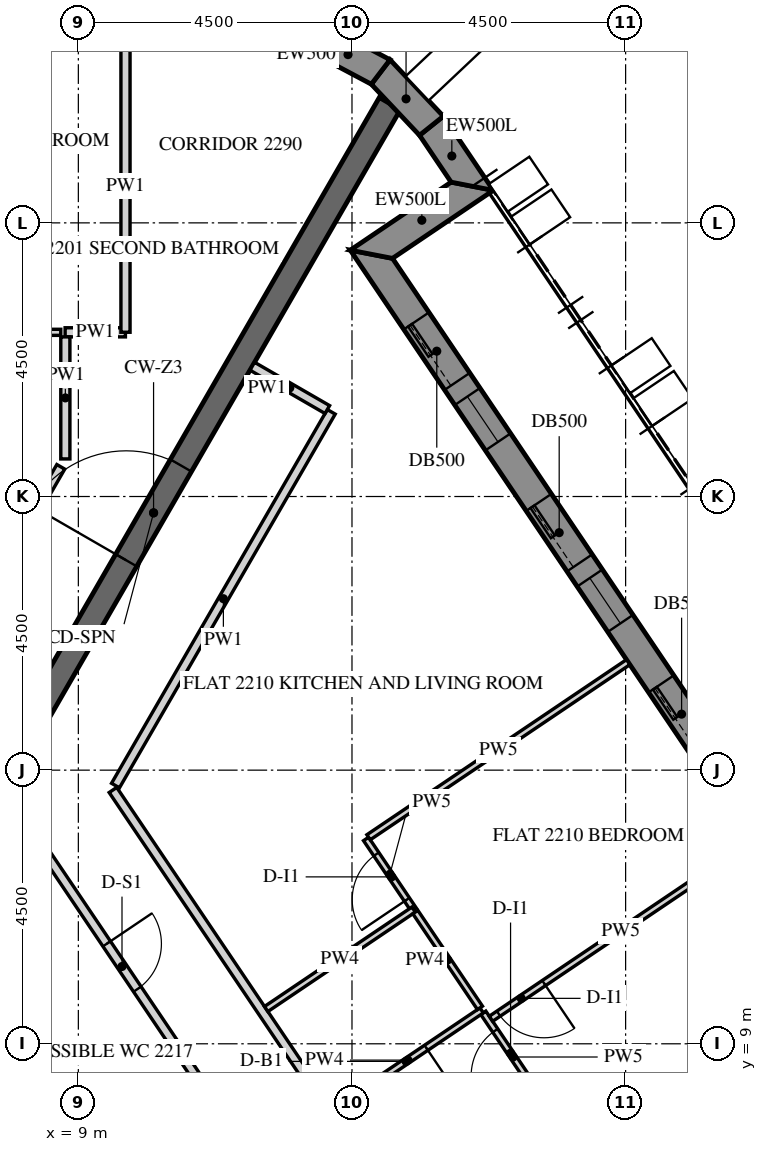
"""IFC4 building model, lengths in metres.
Left out: names, types, materials, properties, quantities, classifications, styles, units other than length and angle.
Written with IfcOpenShell. Run it as: python <this file> out.ifc"""

import sys

from ifc_helpers import new_model, si_unit, direction, frame, frame_2d, origin, place, context, subcontext, project, spatial, polyline, rectangle, outline, extrude, element, fill, save


model = new_model("IFC4")
c1 = context("Model", 3, precision=1e-05, world=origin(), true_north=direction((0.0, 1.0)))
c2 = subcontext(c1, "Body", "Model", "MODEL_VIEW")
j1 = project(units=[si_unit("LENGTHUNIT", "METRE"), si_unit("PLANEANGLEUNIT", "RADIAN")], contexts=[c1])
p1 = place(None, origin())
s1 = spatial("IfcSite", under=j1, at=p1, CompositionType="ELEMENT")
p2 = place(p1, origin())
s2 = spatial("IfcBuilding", under=s1, at=p2, CompositionType="ELEMENT")
p3 = place(p2, frame((0.0, 0.0, 279.6)))
s3 = spatial("IfcBuildingStorey", under=s2, at=p3, CompositionType="ELEMENT", Elevation=279.6)
p4 = place(p3, frame((26.706, 2.879, -0.15), z_axis=(0.0, 0.0, 1.0), x_axis=(-0.559197891507, 0.829034208061, 0.0)))
e1 = element("IfcWall", 1, at=p4, inside=s3, PredefinedType="SOLIDWALL", context=c2, shape_type="SweptSolid", body=[
    extrude(outline(polyline([(0.25, -0.25), (22.795, -0.25), (23.295, 0.25), (-0.25, 0.25), (0.25, -0.25)])), origin(), (0.0, 0.0, 1.0), 3.9),
])
p5 = place(p4, frame((1.323, 0.0, 1.05)))
e2 = element("IfcOpeningElement", 2, at=p5, cuts=e1, PredefinedType="OPENING", context=c2, shape_type="SweptSolid", body=[
    extrude(rectangle(XDim=0.9, YDim=1.5, at=frame_2d((0.45, 0.75))), frame((0.0, 0.26, 0.0), z_axis=(0.0, -1.0, 0.0), x_axis=(1.0, 0.0, 0.0)), (0.0, 0.0, 1.0), 0.52),
])
p6 = place(p4, frame((2.522, 0.0, 0.15)))
e3 = element("IfcOpeningElement", 3, at=p6, cuts=e1, PredefinedType="OPENING", context=c2, shape_type="SweptSolid", body=[
    extrude(rectangle(XDim=1.2, YDim=2.4, at=frame_2d((0.6, 1.2))), frame((0.0, 0.26, 0.0), z_axis=(0.0, -1.0, 0.0), x_axis=(1.0, 0.0, 0.0)), (0.0, 0.0, 1.0), 0.52),
])
p7 = place(p4, frame((4.922, 0.0, 1.05)))
e4 = element("IfcOpeningElement", 4, at=p7, cuts=e1, PredefinedType="OPENING", context=c2, shape_type="SweptSolid", body=[
    extrude(rectangle(XDim=0.9, YDim=1.5, at=frame_2d((0.45, 0.75))), frame((0.0, 0.26, 0.0), z_axis=(0.0, -1.0, 0.0), x_axis=(1.0, 0.0, 0.0)), (0.0, 0.0, 1.0), 0.52),
])
p8 = place(p4, frame((6.122, 0.0, 0.15)))
e5 = element("IfcOpeningElement", 5, at=p8, cuts=e1, PredefinedType="OPENING", context=c2, shape_type="SweptSolid", body=[
    extrude(rectangle(XDim=1.2, YDim=2.4, at=frame_2d((0.6, 1.2))), frame((0.0, 0.26, 0.0), z_axis=(0.0, -1.0, 0.0), x_axis=(1.0, 0.0, 0.0)), (0.0, 0.0, 1.0), 0.52),
])
p9 = place(p4, frame((8.522, 0.0, 1.05)))
e6 = element("IfcOpeningElement", 6, at=p9, cuts=e1, PredefinedType="OPENING", context=c2, shape_type="SweptSolid", body=[
    extrude(rectangle(XDim=0.9, YDim=1.5, at=frame_2d((0.45, 0.75))), frame((0.0, 0.26, 0.0), z_axis=(0.0, -1.0, 0.0), x_axis=(1.0, 0.0, 0.0)), (0.0, 0.0, 1.0), 0.52),
])
p10 = place(p4, frame((9.722, 0.0, 0.15)))
e7 = element("IfcOpeningElement", 7, at=p10, cuts=e1, PredefinedType="OPENING", context=c2, shape_type="SweptSolid", body=[
    extrude(rectangle(XDim=1.2, YDim=2.4, at=frame_2d((0.6, 1.2))), frame((0.0, 0.26, 0.0), z_axis=(0.0, -1.0, 0.0), x_axis=(1.0, 0.0, 0.0)), (0.0, 0.0, 1.0), 0.52),
])
p11 = place(p4, frame((12.122, 0.0, 1.05)))
e8 = element("IfcOpeningElement", 8, at=p11, cuts=e1, PredefinedType="OPENING", context=c2, shape_type="SweptSolid", body=[
    extrude(rectangle(XDim=0.9, YDim=1.5, at=frame_2d((0.45, 0.75))), frame((0.0, 0.26, 0.0), z_axis=(0.0, -1.0, 0.0), x_axis=(1.0, 0.0, 0.0)), (0.0, 0.0, 1.0), 0.52),
])
p12 = place(p4, frame((13.323, 0.0, 0.15)))
e9 = element("IfcOpeningElement", 9, at=p12, cuts=e1, PredefinedType="OPENING", context=c2, shape_type="SweptSolid", body=[
    extrude(rectangle(XDim=1.2, YDim=2.4, at=frame_2d((0.6, 1.2))), frame((0.0, 0.26, 0.0), z_axis=(0.0, -1.0, 0.0), x_axis=(1.0, 0.0, 0.0)), (0.0, 0.0, 1.0), 0.52),
])
p13 = place(p4, frame((15.722, 0.0, 1.05)))
e10 = element("IfcOpeningElement", 10, at=p13, cuts=e1, PredefinedType="OPENING", context=c2, shape_type="SweptSolid", body=[
    extrude(rectangle(XDim=0.9, YDim=1.5, at=frame_2d((0.45, 0.75))), frame((0.0, 0.26, 0.0), z_axis=(0.0, -1.0, 0.0), x_axis=(1.0, 0.0, 0.0)), (0.0, 0.0, 1.0), 0.52),
])
p14 = place(p4, frame((16.922, 0.0, 0.15)))
e11 = element("IfcOpeningElement", 11, at=p14, cuts=e1, PredefinedType="OPENING", context=c2, shape_type="SweptSolid", body=[
    extrude(rectangle(XDim=1.2, YDim=2.4, at=frame_2d((0.6, 1.2))), frame((0.0, 0.26, 0.0), z_axis=(0.0, -1.0, 0.0), x_axis=(1.0, 0.0, 0.0)), (0.0, 0.0, 1.0), 0.52),
])
p15 = place(p4, frame((19.323, 0.0, 1.05)))
e12 = element("IfcOpeningElement", 12, at=p15, cuts=e1, PredefinedType="OPENING", context=c2, shape_type="SweptSolid", body=[
    extrude(rectangle(XDim=0.9, YDim=1.5, at=frame_2d((0.45, 0.75))), frame((0.0, 0.26, 0.0), z_axis=(0.0, -1.0, 0.0), x_axis=(1.0, 0.0, 0.0)), (0.0, 0.0, 1.0), 0.52),
])
p16 = place(p4, frame((20.522, 0.0, 0.15)))
e13 = element("IfcOpeningElement", 13, at=p16, cuts=e1, PredefinedType="OPENING", context=c2, shape_type="SweptSolid", body=[
    extrude(rectangle(XDim=1.2, YDim=2.4, at=frame_2d((0.6, 1.2))), frame((0.0, 0.26, 0.0), z_axis=(0.0, -1.0, 0.0), x_axis=(1.0, 0.0, 0.0)), (0.0, 0.0, 1.0), 0.52),
])
p17 = place(p3, frame((13.819, 21.984, -0.15), z_axis=(0.0, 0.0, 1.0), x_axis=(0.829052389485, 0.559170935841, 0.0)))
e14 = element("IfcWall", 14, at=p17, inside=s3, PredefinedType="SOLIDWALL", context=c2, shape_type="SweptSolid", body=[
    extrude(outline(polyline([(0.25, -0.25), (2.25, -0.25), (1.75, 0.25), (-0.25, 0.25), (0.25, -0.25)])), origin(), (0.0, 0.0, 1.0), 3.9),
])
p18 = place(p3, frame((15.478, 23.102, -0.15), z_axis=(0.0, 0.0, 1.0), x_axis=(-0.559245726333, 0.829001940636, 0.0)))
e15 = element("IfcWall", 15, at=p18, inside=s3, PredefinedType="SOLIDWALL", context=c2, shape_type="SweptSolid", body=[
    extrude(outline(polyline([(-0.25, -0.25), (1.221, -0.25), (1.18, 0.25), (0.25, 0.25), (-0.25, -0.25)])), origin(), (0.0, 0.0, 1.0), 3.9),
])
p19 = place(p3, frame((14.806, 24.097, -0.15), z_axis=(0.0, 0.0, 1.0), x_axis=(-0.686234452793, 0.727380420275, 0.0)))
e16 = element("IfcWall", 16, at=p19, inside=s3, PredefinedType="SOLIDWALL", context=c2, shape_type="SweptSolid", body=[
    extrude(outline(polyline([(-0.021, -0.25), (1.257, -0.25), (1.175, 0.25), (0.021, 0.25), (-0.021, -0.25)])), origin(), (0.0, 0.0, 1.0), 3.9),
])
p20 = place(p3, frame((13.972, 24.982, -0.15), z_axis=(0.0, 0.0, 1.0), x_axis=(-0.882902492938, 0.469556373575, 0.0)))
e17 = element("IfcWall", 17, at=p20, inside=s3, PredefinedType="SOLIDWALL", context=c2, shape_type="SweptSolid", body=[
    extrude(outline(polyline([(-0.041, -0.25), (1.257, -0.25), (1.175, 0.25), (0.041, 0.25), (-0.041, -0.25)])), origin(), (0.0, 0.0, 1.0), 3.9),
])
p21 = place(p3, frame((12.471, 0.0, -0.15), z_axis=(0.0, 0.0, 1.0), x_axis=(-0.499996419489, 0.866027470984, 0.0)))
e18 = element("IfcWall", 18, at=p21, inside=s3, PredefinedType="SHEAR", context=c2, shape_type="SweptSolid", body=[
    extrude(outline(polyline([(-0.115, -0.2), (12.586, -0.2), (12.355, 0.2), (0.115, 0.2), (-0.115, -0.2)])), origin(), (0.0, 0.0, 1.0), 3.9),
])
p22 = place(p21, frame((5.306, 0.0, 0.15)))
e19 = element("IfcOpeningElement", 19, at=p22, cuts=e18, PredefinedType="OPENING", context=c2, shape_type="SweptSolid", body=[
    extrude(rectangle(XDim=1.8, YDim=2.4, at=frame_2d((0.9, 1.2))), frame((0.0, 0.21, 0.0), z_axis=(0.0, -1.0, 0.0), x_axis=(1.0, 0.0, 0.0)), (0.0, 0.0, 1.0), 0.42),
])
p23 = place(p3, frame((6.351, 11.0, -0.15), z_axis=(0.0, 0.0, 1.0), x_axis=(0.499998894578, 0.866026041999, 0.0)))
e20 = element("IfcWall", 20, at=p23, inside=s3, PredefinedType="SHEAR", context=c2, shape_type="SweptSolid", body=[
    extrude(rectangle(XDim=15.544, YDim=0.4, at=frame_2d((7.772, 0.0))), origin(), (0.0, 0.0, 1.0), 3.9),
])
p24 = place(p23, frame((6.872, 0.0, 0.15)))
e21 = element("IfcOpeningElement", 21, at=p24, cuts=e20, PredefinedType="OPENING", context=c2, shape_type="SweptSolid", body=[
    extrude(rectangle(XDim=1.8, YDim=2.4, at=frame_2d((0.9, 1.2))), frame((0.0, 0.21, 0.0), z_axis=(0.0, -1.0, 0.0), x_axis=(1.0, 0.0, 0.0)), (0.0, 0.0, 1.0), 0.42),
])
p25 = place(p3, frame((9.774, 20.7, 0.0), z_axis=(0.0, 0.0, 1.0), x_axis=(-1.0, 0.0, 0.0)))
e22 = element("IfcWall", 22, at=p25, inside=s3, PredefinedType="PARTITIONING", context=c2, shape_type="SweptSolid", body=[
    extrude(rectangle(XDim=0.991, YDim=0.15, at=frame_2d((0.496, 0.0))), origin(), (0.0, 0.0, 1.0), 2.988),
])
p26 = place(p3, frame((9.775, 25.5, 0.0), z_axis=(0.0, 0.0, 1.0), x_axis=(0.0, -1.0, 0.0)))
e23 = element("IfcWall", 23, at=p26, inside=s3, PredefinedType="PARTITIONING", context=c2, shape_type="SweptSolid", body=[
    extrude(rectangle(XDim=4.799, YDim=0.15, at=frame_2d((2.399, 0.0))), origin(), (0.0, 0.0, 1.0), 2.988),
])
p27 = place(p3, frame((8.786, 20.625, 0.0), z_axis=(0.0, 0.0, 1.0), x_axis=(0.0, -1.0, 0.0)))
e24 = element("IfcWall", 24, at=p27, inside=s3, PredefinedType="PARTITIONING", context=c2, shape_type="SweptSolid", body=[
    extrude(rectangle(XDim=2.007, YDim=0.15, at=frame_2d((1.003, 0.0))), origin(), (0.0, 0.0, 1.0), 2.988),
])
p28 = place(p3, frame((8.711, 18.488, 0.0), z_axis=(0.0, 0.0, 1.0), x_axis=(-0.500075402517, -0.865981865744, 0.0)))
e25 = element("IfcWall", 25, at=p28, inside=s3, PredefinedType="PARTITIONING", context=c2, shape_type="SweptSolid", body=[
    extrude(rectangle(XDim=2.515, YDim=0.15, at=frame_2d((1.257, 0.0))), origin(), (0.0, 0.0, 1.0), 2.988),
])
p29 = place(p3, frame((19.228, -1.146, 0.0), z_axis=(0.0, 0.0, 1.0), x_axis=(-0.559173750718, 0.829050490928, 0.0)))
e26 = element("IfcWall", 26, at=p29, inside=s3, PredefinedType="PARTITIONING", context=c2, shape_type="SweptSolid", body=[
    extrude(rectangle(XDim=17.273, YDim=0.15, at=frame_2d((8.637, 0.0))), origin(), (0.0, 0.0, 1.0), 2.988),
])
p30 = place(p29, frame((9.478, 0.0, 0.0)))
e27 = element("IfcOpeningElement", 27, at=p30, cuts=e26, PredefinedType="OPENING", context=c2, shape_type="SweptSolid", body=[
    extrude(rectangle(XDim=1.0, YDim=2.1, at=frame_2d((0.5, 1.05))), frame((0.0, 0.085, 0.0), z_axis=(0.0, -1.0, 0.0), x_axis=(1.0, 0.0, 0.0)), (0.0, 0.0, 1.0), 0.17),
])
p31 = place(p3, frame((9.611, 13.246, 0.0), z_axis=(0.0, 0.0, 1.0), x_axis=(0.499994435258, 0.866028616566, 0.0)))
e28 = element("IfcWall", 28, at=p31, inside=s3, PredefinedType="PARTITIONING", context=c2, shape_type="SweptSolid", body=[
    extrude(rectangle(XDim=7.097, YDim=0.15, at=frame_2d((3.548, 0.0))), origin(), (0.0, 0.0, 1.0), 2.988),
])
p32 = place(p3, frame((13.094, 19.43, 0.0), z_axis=(0.0, 0.0, 1.0), x_axis=(-0.866062911188, 0.499935029643, 0.0)))
e29 = element("IfcWall", 29, at=p32, inside=s3, PredefinedType="PARTITIONING", context=c2, shape_type="SweptSolid", body=[
    extrude(rectangle(XDim=1.425, YDim=0.15, at=frame_2d((0.712, 0.0))), origin(), (0.0, 0.0, 1.0), 2.988),
])
p33 = place(p3, frame((8.028, 12.777, 0.0), z_axis=(0.0, 0.0, 1.0), x_axis=(0.559175239609, -0.829049486707, 0.0)))
e30 = element("IfcWall", 30, at=p33, inside=s3, PredefinedType="PARTITIONING", context=c2, shape_type="SweptSolid", body=[
    extrude(rectangle(XDim=6.045, YDim=0.15, at=frame_2d((3.022, 0.0))), origin(), (0.0, 0.0, 1.0), 2.988),
])
p34 = place(p33, frame((2.572, 0.0, 0.0)))
e31 = element("IfcOpeningElement", 31, at=p34, cuts=e30, PredefinedType="OPENING", context=c2, shape_type="SweptSolid", body=[
    extrude(rectangle(XDim=0.9, YDim=2.1, at=frame_2d((0.45, 1.05))), frame((0.0, 0.085, 0.0), z_axis=(0.0, -1.0, 0.0), x_axis=(1.0, 0.0, 0.0)), (0.0, 0.0, 1.0), 0.17),
])
p35 = place(p3, frame((6.836, 20.7, 0.0), z_axis=(0.0, 0.0, 1.0), x_axis=(1.0, 0.0, 0.0)))
e32 = element("IfcWall", 32, at=p35, inside=s3, PredefinedType="PARTITIONING", context=c2, shape_type="SweptSolid", body=[
    extrude(rectangle(XDim=1.875, YDim=0.1, at=frame_2d((0.938, 0.0))), origin(), (0.0, 0.0, 1.0), 2.988),
])
p36 = place(p3, frame((22.069, 9.307, 0.0), z_axis=(0.0, 0.0, 1.0), x_axis=(-0.829042649773, -0.559185376111, 0.0)))
e33 = element("IfcWall", 33, at=p36, inside=s3, PredefinedType="PARTITIONING", context=c2, shape_type="SweptSolid", body=[
    extrude(rectangle(XDim=8.125, YDim=0.18, at=frame_2d((4.062, 0.0))), origin(), (0.0, 0.0, 1.0), 2.988),
])
p37 = place(p3, frame((14.515, 11.206, 0.0), z_axis=(0.0, 0.0, 1.0), x_axis=(-0.559272477643, 0.828983893542, 0.0)))
e34 = element("IfcWall", 34, at=p37, inside=s3, PredefinedType="PARTITIONING", context=c2, shape_type="SweptSolid", body=[
    extrude(rectangle(XDim=1.402, YDim=0.1, at=frame_2d((0.701, 0.0))), origin(), (0.0, 0.0, 1.0), 2.988),
])
p38 = place(p37, frame((0.2, 0.0, 0.0)))
e35 = element("IfcOpeningElement", 35, at=p38, cuts=e34, PredefinedType="OPENING", context=c2, shape_type="SweptSolid", body=[
    extrude(rectangle(XDim=0.9, YDim=2.1, at=frame_2d((0.45, 1.05))), frame((0.0, 0.06, 0.0), z_axis=(0.0, -1.0, 0.0), x_axis=(1.0, 0.0, 0.0)), (0.0, 0.0, 1.0), 0.12),
])
p39 = place(p3, frame((13.773, 12.396, 0.0), z_axis=(0.0, 0.0, 1.0), x_axis=(0.82903328576, 0.559199258853, 0.0)))
e36 = element("IfcWall", 36, at=p39, inside=s3, PredefinedType="PARTITIONING", context=c2, shape_type="SweptSolid", body=[
    extrude(rectangle(XDim=5.15, YDim=0.1, at=frame_2d((2.575, 0.0))), origin(), (0.0, 0.0, 1.0), 2.988),
])
p40 = place(p3, frame((12.089, 9.572, 0.0), z_axis=(0.0, 0.0, 1.0), x_axis=(0.829046031219, 0.559180362781, 0.0)))
e37 = element("IfcWall", 37, at=p40, inside=s3, PredefinedType="PARTITIONING", context=c2, shape_type="SweptSolid", body=[
    extrude(rectangle(XDim=2.925, YDim=0.1, at=frame_2d((1.462, 0.0))), origin(), (0.0, 0.0, 1.0), 2.988),
])
p41 = place(p3, frame((16.64, 8.056, 0.0), z_axis=(0.0, 0.0, 1.0), x_axis=(-0.559157243835, 0.829061624167, 0.0)))
e38 = element("IfcWall", 38, at=p41, inside=s3, PredefinedType="PARTITIONING", context=c2, shape_type="SweptSolid", body=[
    extrude(rectangle(XDim=1.754, YDim=0.1, at=frame_2d((0.877, 0.0))), origin(), (0.0, 0.0, 1.0), 2.988),
])
p42 = place(p41, frame((0.502, 0.0, 0.0)))
e39 = element("IfcOpeningElement", 39, at=p42, cuts=e38, PredefinedType="OPENING", context=c2, shape_type="SweptSolid", body=[
    extrude(rectangle(XDim=0.9, YDim=2.1, at=frame_2d((0.45, 1.05))), frame((0.0, 0.06, 0.0), z_axis=(0.0, -1.0, 0.0), x_axis=(1.0, 0.0, 0.0)), (0.0, 0.0, 1.0), 0.12),
])
p43 = place(p3, frame((15.633, 9.55, 0.0), z_axis=(0.0, 0.0, 1.0), x_axis=(-0.829033436212, -0.559199035802, 0.0)))
e40 = element("IfcWall", 40, at=p43, inside=s3, PredefinedType="PARTITIONING", context=c2, shape_type="SweptSolid", body=[
    extrude(rectangle(XDim=2.925, YDim=0.1, at=frame_2d((1.462, 0.0))), origin(), (0.0, 0.0, 1.0), 2.988),
])
p44 = place(p43, frame((1.1, 0.0, 0.0)))
e41 = element("IfcOpeningElement", 41, at=p44, cuts=e40, PredefinedType="OPENING", context=c2, shape_type="SweptSolid", body=[
    extrude(rectangle(XDim=0.8, YDim=2.1, at=frame_2d((0.4, 1.05))), frame((0.0, 0.06, 0.0), z_axis=(0.0, -1.0, 0.0), x_axis=(1.0, 0.0, 0.0)), (0.0, 0.0, 1.0), 0.12),
])
p45 = place(p3, frame((20.055, 12.292, 0.0), z_axis=(0.0, 0.0, 1.0), x_axis=(-0.82903328576, -0.559199258853, 0.0)))
e42 = element("IfcWall", 42, at=p45, inside=s3, PredefinedType="PARTITIONING", context=c2, shape_type="SweptSolid", body=[
    extrude(rectangle(XDim=5.15, YDim=0.1, at=frame_2d((2.575, 0.0))), origin(), (0.0, 0.0, 1.0), 2.988),
])
p46 = place(p45, frame((4.1, 0.0, 0.0)))
e43 = element("IfcOpeningElement", 43, at=p46, cuts=e42, PredefinedType="OPENING", context=c2, shape_type="SweptSolid", body=[
    extrude(rectangle(XDim=0.9, YDim=2.1, at=frame_2d((0.45, 1.05))), frame((0.0, 0.06, 0.0), z_axis=(0.0, -1.0, 0.0), x_axis=(1.0, 0.0, 0.0)), (0.0, 0.0, 1.0), 0.12),
])
p47 = place(p3, frame((14.542, 11.166, 0.0), z_axis=(0.0, 0.0, 1.0), x_axis=(0.559170428633, -0.829052731581, 0.0)))
e44 = element("IfcWall", 44, at=p47, inside=s3, PredefinedType="PARTITIONING", context=c2, shape_type="SweptSolid", body=[
    extrude(rectangle(XDim=1.9, YDim=0.1, at=frame_2d((0.95, 0.0))), origin(), (0.0, 0.0, 1.0), 2.988),
])
p48 = place(p12, frame((0.0, 0.175, 0.0)))
e45 = element("IfcDoor", 45, at=p48, inside=s3, OperationType="SLIDING_TO_LEFT", PredefinedType="DOOR", context=c2, shape_type="SweptSolid", body=[
    extrude(rectangle(XDim=1.2, YDim=2.4, at=frame_2d((0.6, 1.2))), frame((0.0, 0.025, 0.0), z_axis=(0.0, -1.0, 0.0), x_axis=(1.0, 0.0, 0.0)), (0.0, 0.0, 1.0), 0.05),
])
fill(e9, e45)
p49 = place(p13, frame((0.0, 0.18, 0.0)))
e46 = element("IfcWindow", 46, at=p49, inside=s3, PartitioningType="SINGLE_PANEL", PredefinedType="WINDOW", context=c2, shape_type="SweptSolid", body=[
    extrude(rectangle(XDim=0.9, YDim=1.5, at=frame_2d((0.45, 0.75))), frame((0.0, 0.03, 0.0), z_axis=(0.0, -1.0, 0.0), x_axis=(1.0, 0.0, 0.0)), (0.0, 0.0, 1.0), 0.06),
])
fill(e10, e46)
p50 = place(p14, frame((0.0, 0.175, 0.0)))
e47 = element("IfcDoor", 47, at=p50, inside=s3, OperationType="SLIDING_TO_LEFT", PredefinedType="DOOR", context=c2, shape_type="SweptSolid", body=[
    extrude(rectangle(XDim=1.2, YDim=2.4, at=frame_2d((0.6, 1.2))), frame((0.0, 0.025, 0.0), z_axis=(0.0, -1.0, 0.0), x_axis=(1.0, 0.0, 0.0)), (0.0, 0.0, 1.0), 0.05),
])
fill(e11, e47)
p51 = place(p15, frame((0.0, 0.18, 0.0)))
e48 = element("IfcWindow", 48, at=p51, inside=s3, PartitioningType="SINGLE_PANEL", PredefinedType="WINDOW", context=c2, shape_type="SweptSolid", body=[
    extrude(rectangle(XDim=0.9, YDim=1.5, at=frame_2d((0.45, 0.75))), frame((0.0, 0.03, 0.0), z_axis=(0.0, -1.0, 0.0), x_axis=(1.0, 0.0, 0.0)), (0.0, 0.0, 1.0), 0.06),
])
fill(e12, e48)
p52 = place(p16, frame((0.0, 0.175, 0.0)))
e49 = element("IfcDoor", 49, at=p52, inside=s3, OperationType="SLIDING_TO_LEFT", PredefinedType="DOOR", context=c2, shape_type="SweptSolid", body=[
    extrude(rectangle(XDim=1.2, YDim=2.4, at=frame_2d((0.6, 1.2))), frame((0.0, 0.025, 0.0), z_axis=(0.0, -1.0, 0.0), x_axis=(1.0, 0.0, 0.0)), (0.0, 0.0, 1.0), 0.05),
])
fill(e13, e49)
p53 = place(p24, origin())
e50 = element("IfcDoor", 50, at=p53, inside=s3, OperationType="DOUBLE_DOOR_SINGLE_SWING", PredefinedType="DOOR", context=c2, shape_type="SweptSolid", body=[
    extrude(rectangle(XDim=1.8, YDim=2.4, at=frame_2d((0.9, 1.2))), frame((0.0, 0.025, 0.0), z_axis=(0.0, -1.0, 0.0), x_axis=(1.0, 0.0, 0.0)), (0.0, 0.0, 1.0), 0.05),
])
fill(e21, e50)
p54 = place(p42, origin())
e51 = element("IfcDoor", 51, at=p54, inside=s3, OperationType="SINGLE_SWING_RIGHT", PredefinedType="DOOR", context=c2, shape_type="SweptSolid", body=[
    extrude(rectangle(XDim=0.9, YDim=2.1, at=frame_2d((0.45, 1.05))), frame((0.0, 0.025, 0.0), z_axis=(0.0, -1.0, 0.0), x_axis=(1.0, 0.0, 0.0)), (0.0, 0.0, 1.0), 0.05),
])
fill(e39, e51)
p55 = place(p46, origin())
e52 = element("IfcDoor", 52, at=p55, inside=s3, OperationType="SINGLE_SWING_RIGHT", PredefinedType="DOOR", context=c2, shape_type="SweptSolid", body=[
    extrude(rectangle(XDim=0.9, YDim=2.1, at=frame_2d((0.45, 1.05))), frame((0.0, 0.025, 0.0), z_axis=(0.0, -1.0, 0.0), x_axis=(1.0, 0.0, 0.0)), (0.0, 0.0, 1.0), 0.05),
])
fill(e43, e52)
p56 = place(p38, origin())
e53 = element("IfcDoor", 53, at=p56, inside=s3, OperationType="SINGLE_SWING_RIGHT", PredefinedType="DOOR", context=c2, shape_type="SweptSolid", body=[
    extrude(rectangle(XDim=0.9, YDim=2.1, at=frame_2d((0.45, 1.05))), frame((0.0, 0.025, 0.0), z_axis=(0.0, -1.0, 0.0), x_axis=(1.0, 0.0, 0.0)), (0.0, 0.0, 1.0), 0.05),
])
fill(e35, e53)
p57 = place(p44, origin())
e54 = element("IfcDoor", 54, at=p57, inside=s3, OperationType="SINGLE_SWING_LEFT", PredefinedType="DOOR", context=c2, shape_type="SweptSolid", body=[
    extrude(rectangle(XDim=0.8, YDim=2.1, at=frame_2d((0.4, 1.05))), frame((0.0, 0.025, 0.0), z_axis=(0.0, -1.0, 0.0), x_axis=(1.0, 0.0, 0.0)), (0.0, 0.0, 1.0), 0.05),
])
fill(e41, e54)
p58 = place(p34, origin())
e55 = element("IfcDoor", 55, at=p58, inside=s3, OperationType="SINGLE_SWING_RIGHT", PredefinedType="DOOR", context=c2, shape_type="SweptSolid", body=[
    extrude(rectangle(XDim=0.9, YDim=2.1, at=frame_2d((0.45, 1.05))), frame((0.0, 0.025, 0.0), z_axis=(0.0, -1.0, 0.0), x_axis=(1.0, 0.0, 0.0)), (0.0, 0.0, 1.0), 0.05),
])
fill(e31, e55)
save(model, sys.argv[1])
